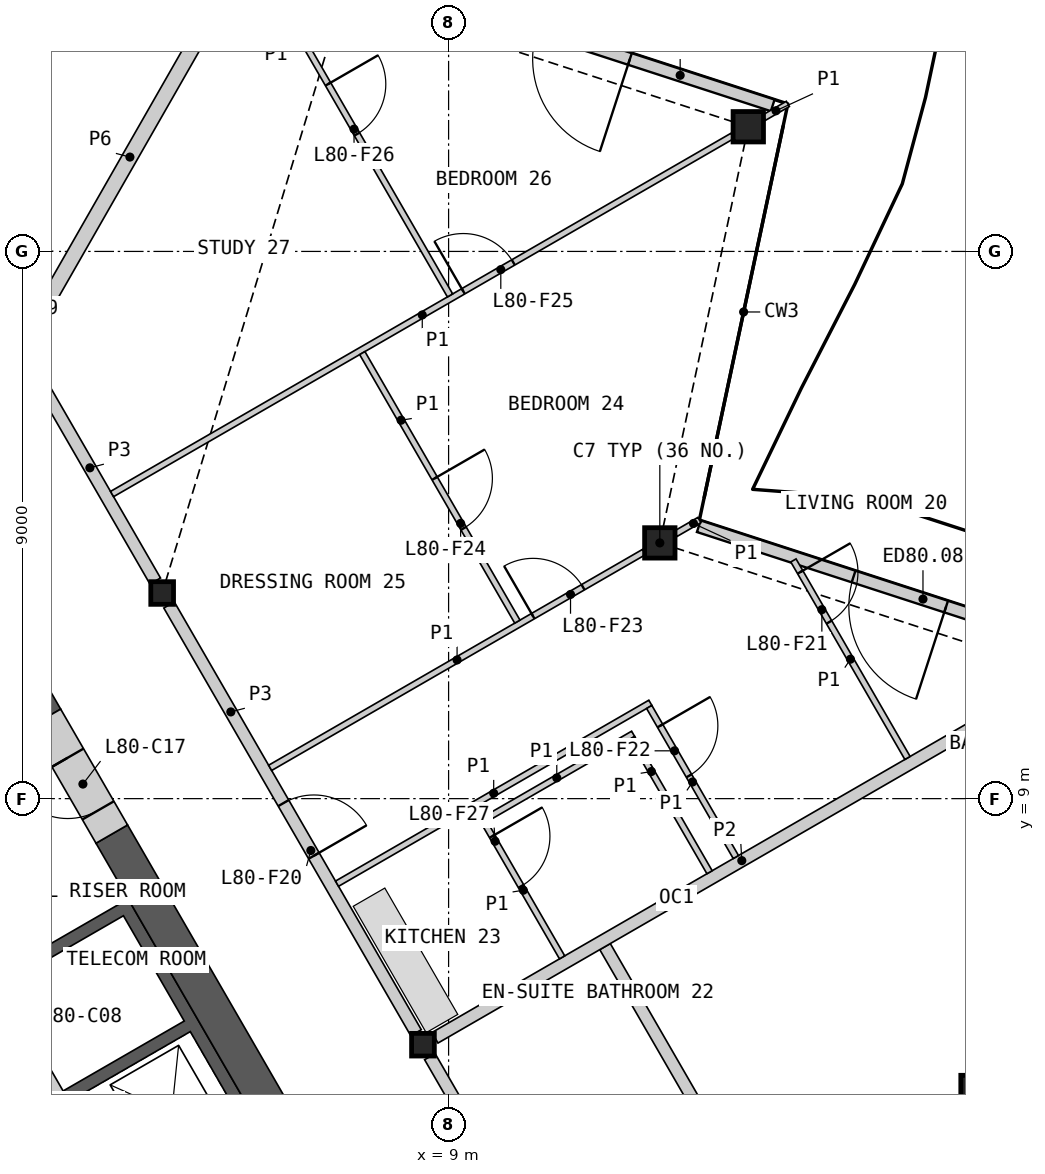
"""IFC4 building model, lengths in metres.
Left out: names, types, materials, properties, quantities, classifications, styles, units other than length and angle.
Written with IfcOpenShell. Run it as: python <this file> out.ifc"""

import sys

from ifc_helpers import new_model, si_unit, direction, frame, frame_2d, origin, origin_2d, place, context, subcontext, project, spatial, polyline, rectangle, hollow_rectangle, i_section, outline, extrude, element, fill, save


model = new_model("IFC4")
c1 = context("Model", 3, precision=1e-05, world=origin(), true_north=direction((0.0, 1.0)))
c2 = subcontext(c1, "Body", "Model", "MODEL_VIEW")
j1 = project(units=[si_unit("LENGTHUNIT", "METRE"), si_unit("PLANEANGLEUNIT", "RADIAN")], contexts=[c1])
p1 = place(None, origin())
s1 = spatial("IfcSite", under=j1, at=p1, CompositionType="ELEMENT")
p2 = place(p1, origin())
s2 = spatial("IfcBuilding", under=s1, at=p2, CompositionType="ELEMENT")
p3 = place(p2, frame((0.0, 0.0, 361.0)))
s3 = spatial("IfcBuildingStorey", under=s2, at=p3, CompositionType="ELEMENT", Elevation=361.0)
for number, where, z_axis, x_axis in (
    (1, (17.674, 4.199, 0.0), (0.0, 0.0, 1.0), (1.0, 0.0, 0.0)),
    (2, (12.474, 13.206, 0.0), (0.0, 0.0, 1.0), (1.0, 0.0, 0.0)),
    (3, (13.929, 20.051, 0.0), (0.0, 0.0, 1.0), (1.0, 0.0, 0.0)),
):
    element("IfcColumn", number, at=place(p3, frame(where, z_axis=z_axis, x_axis=x_axis)), inside=s3, PredefinedType="COLUMN", context=c2, shape_type="SweptSolid", body=[
        extrude(hollow_rectangle(XDim=0.5, YDim=0.5, WallThickness=0.03, at=origin_2d()), origin(), (0.0, 0.0, 1.0), 3.4),
    ])
for number, where, z_axis, x_axis in (
    (4, (8.578, 4.953, 0.0), (0.0, 0.0, 1.0), (1.0, 0.0, 0.0)),
    (5, (4.289, 12.382, 0.0), (0.0, 0.0, 1.0), (1.0, 0.0, 0.0)),
):
    element("IfcColumn", number, at=place(p3, frame(where, z_axis=z_axis, x_axis=x_axis)), inside=s3, PredefinedType="COLUMN", context=c2, shape_type="SweptSolid", body=[
        extrude(i_section(OverallWidth=0.374, OverallDepth=0.372, WebThickness=0.016, FlangeThickness=0.026, at=origin_2d()), origin(), (0.0, 0.0, 1.0), 3.4),
    ])
p4 = place(p3, frame((19.467, 11.416, 0.0), z_axis=(0.0, 0.0, 1.0), x_axis=(-0.951057706878, 0.309013330114, 0.0)))
e6 = element("IfcWall", 6, at=p4, inside=s3, PredefinedType="SOLIDWALL", context=c2, shape_type="SweptSolid", body=[
    extrude(rectangle(XDim=6.678, YDim=0.2, at=frame_2d((3.339, 0.0))), origin(), (0.0, 0.0, 1.0), 2.634),
])
p5 = place(p4, frame((2.402, 0.0, 0.0)))
e7 = element("IfcOpeningElement", 7, at=p5, cuts=e6, PredefinedType="OPENING", context=c2, shape_type="SweptSolid", body=[
    extrude(rectangle(XDim=1.6, YDim=2.25, at=frame_2d((0.8, 1.125))), frame((0.0, 0.11, 0.0), z_axis=(0.0, -1.0, 0.0), x_axis=(1.0, 0.0, 0.0)), (0.0, 0.0, 1.0), 0.22),
])
p6 = place(p3, frame((14.331, 20.402, 0.0), z_axis=(0.0, 0.0, 1.0), x_axis=(-0.951058447414, 0.30901105094, 0.0)))
e8 = element("IfcWall", 8, at=p6, inside=s3, PredefinedType="SOLIDWALL", context=c2, shape_type="SweptSolid", body=[
    extrude(rectangle(XDim=6.402, YDim=0.2, at=frame_2d((3.201, 0.0))), origin(), (0.0, 0.0, 1.0), 2.634),
])
p7 = place(p6, frame((2.469, 0.0, 0.0)))
e9 = element("IfcOpeningElement", 9, at=p7, cuts=e8, PredefinedType="OPENING", context=c2, shape_type="SweptSolid", body=[
    extrude(rectangle(XDim=1.6, YDim=2.25, at=frame_2d((0.8, 1.125))), frame((0.0, 0.11, 0.0), z_axis=(0.0, -1.0, 0.0), x_axis=(1.0, 0.0, 0.0)), (0.0, 0.0, 1.0), 0.22),
])
p8 = place(p3, origin())
e10 = element("IfcWall", 10, at=p8, inside=s3, PredefinedType="SHEAR", context=c2, shape_type="SweptSolid", body=[
    extrude(outline(polyline([(1.561, 6.097), (3.731, 7.35), (8.231, -0.444), (6.061, -1.697), (5.96, -1.524), (7.952, -0.374), (6.952, 1.358), (4.96, 0.208), (4.861, 0.381), (6.852, 1.531), (5.852, 3.263), (3.861, 2.113), (3.76, 2.287), (5.752, 3.437), (4.752, 5.169), (2.76, 4.019), (2.66, 4.192), (4.652, 5.342), (3.652, 7.074), (1.66, 5.924), (1.561, 6.097)])), origin(), (0.0, 0.0, 1.0), 3.1),
])
p9 = place(p3, frame((5.817, -1.476, 0.0), z_axis=(0.0, 0.0, 1.0), x_axis=(-0.500002616675, 0.866023893041, 0.0)))
e11 = element("IfcWall", 11, at=p9, inside=s3, PredefinedType="SOLIDWALL", context=c2, shape_type="SweptSolid", body=[
    extrude(rectangle(XDim=8.373, YDim=0.2, at=frame_2d((4.187, 0.0))), origin(), (0.0, 0.0, 1.0), 3.1),
])
p10 = place(p9, frame((0.337, 0.0, 0.0)))
e12 = element("IfcOpeningElement", 12, at=p10, cuts=e11, PredefinedType="OPENING", context=c2, shape_type="SweptSolid", body=[
    extrude(rectangle(XDim=1.1, YDim=2.1, at=frame_2d((0.55, 1.05))), frame((0.0, 0.11, 0.0), z_axis=(0.0, -1.0, 0.0), x_axis=(1.0, 0.0, 0.0)), (0.0, 0.0, 1.0), 0.22),
])
p11 = place(p9, frame((2.537, 0.0, 0.0)))
e13 = element("IfcOpeningElement", 13, at=p11, cuts=e11, PredefinedType="OPENING", context=c2, shape_type="SweptSolid", body=[
    extrude(rectangle(XDim=1.1, YDim=2.1, at=frame_2d((0.55, 1.05))), frame((0.0, 0.11, 0.0), z_axis=(0.0, -1.0, 0.0), x_axis=(1.0, 0.0, 0.0)), (0.0, 0.0, 1.0), 0.22),
])
p12 = place(p9, frame((4.737, 0.0, 0.0)))
e14 = element("IfcOpeningElement", 14, at=p12, cuts=e11, PredefinedType="OPENING", context=c2, shape_type="SweptSolid", body=[
    extrude(rectangle(XDim=1.1, YDim=2.1, at=frame_2d((0.55, 1.05))), frame((0.0, 0.11, 0.0), z_axis=(0.0, -1.0, 0.0), x_axis=(1.0, 0.0, 0.0)), (0.0, 0.0, 1.0), 0.22),
])
p13 = place(p9, frame((7.037, 0.0, 0.0)))
e15 = element("IfcOpeningElement", 15, at=p13, cuts=e11, PredefinedType="OPENING", context=c2, shape_type="SweptSolid", body=[
    extrude(rectangle(XDim=0.9, YDim=2.1, at=frame_2d((0.45, 1.05))), frame((0.0, 0.11, 0.0), z_axis=(0.0, -1.0, 0.0), x_axis=(1.0, 0.0, 0.0)), (0.0, 0.0, 1.0), 0.22),
])
p14 = place(p3, frame((8.686, -0.634, 0.0), z_axis=(0.0, 0.0, 1.0), x_axis=(-0.50001836461, 0.866014800712, 0.0)))
e16 = element("IfcWall", 16, at=p14, inside=s3, PredefinedType="SHEAR", context=c2, shape_type="SweptSolid", body=[
    extrude(rectangle(XDim=10.451, YDim=0.6, at=frame_2d((5.225, 0.0))), origin(), (0.0, 0.0, 1.0), 3.1),
])
p15 = place(p3, frame((2.361, 10.322, 0.0), z_axis=(0.0, 0.0, 1.0), x_axis=(-0.500000735859, 0.866024978935, 0.0)))
e17 = element("IfcWall", 17, at=p15, inside=s3, PredefinedType="SHEAR", context=c2, shape_type="SweptSolid", body=[
    extrude(rectangle(XDim=4.202, YDim=0.6, at=frame_2d((2.101, 0.0))), origin(), (0.0, 0.0, 1.0), 3.1),
])
p16 = place(p3, frame((3.461, 8.417, 0.0), z_axis=(0.0, 0.0, 1.0), x_axis=(-0.499946605688, 0.86605622881, 0.0)))
e18 = element("IfcWall", 18, at=p16, inside=s3, PredefinedType="SHEAR", context=c2, shape_type="SweptSolid", body=[
    extrude(rectangle(XDim=2.2, YDim=0.6, at=frame_2d((1.1, 0.0))), origin(), (0.0, 0.0, 1.0), 3.1),
])
p17 = place(p16, frame((0.45, 0.0, 0.0)))
e19 = element("IfcOpeningElement", 19, at=p17, cuts=e18, PredefinedType="OPENING", context=c2, shape_type="SweptSolid", body=[
    extrude(rectangle(XDim=1.0, YDim=2.1, at=frame_2d((0.5, 1.05))), frame((0.0, 0.31, 0.0), z_axis=(0.0, -1.0, 0.0), x_axis=(1.0, 0.0, 0.0)), (0.0, 0.0, 1.0), 0.62),
])
p18 = place(p3, frame((1.901, 16.302, 0.0), z_axis=(0.0, 0.0, 1.0), x_axis=(0.496368960053, 0.86811166073, 0.0)))
e20 = element("IfcWall", 20, at=p18, inside=s3, PredefinedType="PARTITIONING", context=c2, shape_type="SweptSolid", body=[
    extrude(rectangle(XDim=14.972, YDim=0.25, at=frame_2d((7.486, 0.0))), origin(), (0.0, 0.0, 1.0), 2.33),
])
p19 = place(p3, frame((4.403, 12.185, 0.0), z_axis=(0.0, 0.0, 1.0), x_axis=(0.499992155518, -0.866029932751, 0.0)))
e21 = element("IfcWall", 21, at=p19, inside=s3, PredefinedType="PARTITIONING", context=c2, shape_type="SweptSolid", body=[
    extrude(rectangle(XDim=8.123, YDim=0.2, at=frame_2d((4.062, 0.0))), origin(), (0.0, 0.0, 1.0), 3.1),
])
p20 = place(p19, frame((3.762, 0.0, 0.0)))
e22 = element("IfcOpeningElement", 22, at=p20, cuts=e21, PredefinedType="OPENING", context=c2, shape_type="SweptSolid", body=[
    extrude(rectangle(XDim=1.0, YDim=2.1, at=frame_2d((0.5, 1.05))), frame((0.0, 0.11, 0.0), z_axis=(0.0, -1.0, 0.0), x_axis=(1.0, 0.0, 0.0)), (0.0, 0.0, 1.0), 0.22),
])
p21 = place(p3, frame((8.692, 4.756, 0.0), z_axis=(0.0, 0.0, 1.0), x_axis=(0.500001682468, -0.866024432409, 0.0)))
e23 = element("IfcWall", 23, at=p21, inside=s3, PredefinedType="PARTITIONING", context=c2, shape_type="SweptSolid", body=[
    extrude(rectangle(XDim=8.124, YDim=0.2, at=frame_2d((4.062, 0.0))), origin(), (0.0, 0.0, 1.0), 3.1),
])
p22 = place(p21, frame((3.587, 0.0, 0.0)))
e24 = element("IfcOpeningElement", 24, at=p22, cuts=e23, PredefinedType="OPENING", context=c2, shape_type="SweptSolid", body=[
    extrude(rectangle(XDim=0.95, YDim=2.1, at=frame_2d((0.475, 1.05))), frame((0.0, 0.11, 0.0), z_axis=(0.0, -1.0, 0.0), x_axis=(1.0, 0.0, 0.0)), (0.0, 0.0, 1.0), 0.22),
])
p23 = place(p3, frame((2.025, 16.303, 0.0), z_axis=(0.0, 0.0, 1.0), x_axis=(0.500004215162, -0.866022970146, 0.0)))
e25 = element("IfcWall", 25, at=p23, inside=s3, PredefinedType="PARTITIONING", context=c2, shape_type="SweptSolid", body=[
    extrude(rectangle(XDim=4.3, YDim=0.2, at=frame_2d((2.15, 0.0))), origin(), (0.0, 0.0, 1.0), 3.1),
])
p24 = place(p3, frame((11.573, 6.566, 0.0), z_axis=(0.0, 0.0, 1.0), x_axis=(0.499993542657, -0.866029131901, 0.0)))
e26 = element("IfcWall", 26, at=p24, inside=s3, PredefinedType="PARTITIONING", context=c2, shape_type="SweptSolid", body=[
    extrude(rectangle(XDim=14.994, YDim=0.2, at=frame_2d((7.497, 0.0))), origin(), (0.0, 0.0, 1.0), 2.33),
])
p25 = place(p24, frame((5.166, 0.0, 0.0)))
e27 = element("IfcOpeningElement", 27, at=p25, cuts=e26, PredefinedType="OPENING", context=c2, shape_type="SweptSolid", body=[
    extrude(rectangle(XDim=0.95, YDim=2.1, at=frame_2d((0.475, 1.05))), frame((0.0, 0.11, 0.0), z_axis=(0.0, -1.0, 0.0), x_axis=(1.0, 0.0, 0.0)), (0.0, 0.0, 1.0), 0.22),
])
p26 = place(p3, frame((8.775, 5.066, 0.0), z_axis=(0.0, 0.0, 1.0), x_axis=(0.866023724155, 0.500002909193, 0.0)))
e28 = element("IfcWall", 28, at=p26, inside=s3, PredefinedType="PARTITIONING", context=c2, shape_type="SweptSolid", body=[
    extrude(rectangle(XDim=11.655, YDim=0.2, at=frame_2d((5.827, 0.0))), origin(), (0.0, 0.0, 1.0), 2.33),
])
p27 = place(p3, frame((0.755, 19.16, 0.0), z_axis=(0.0, 0.0, 1.0), x_axis=(0.15643456532, 0.987688324712, 0.0)))
e29 = element("IfcWall", 29, at=p27, inside=s3, PredefinedType="PARTITIONING", context=c2, shape_type="SweptSolid", body=[
    extrude(rectangle(XDim=12.59, YDim=0.1, at=frame_2d((6.295, 0.0))), origin(), (0.0, 0.0, 1.0), 2.33),
])
p28 = place(p27, frame((7.074, 0.0, 0.0)))
e30 = element("IfcOpeningElement", 30, at=p28, cuts=e29, PredefinedType="OPENING", context=c2, shape_type="SweptSolid", body=[
    extrude(rectangle(XDim=0.95, YDim=2.1, at=frame_2d((0.475, 1.05))), frame((0.0, 0.06, 0.0), z_axis=(0.0, -1.0, 0.0), x_axis=(1.0, 0.0, 0.0)), (0.0, 0.0, 1.0), 0.12),
])
p29 = place(p3, frame((3.465, 14.01, 0.0), z_axis=(0.0, 0.0, 1.0), x_axis=(0.866032376801, 0.499987922186, 0.0)))
e31 = element("IfcWall", 31, at=p29, inside=s3, PredefinedType="PARTITIONING", context=c2, shape_type="SweptSolid", body=[
    extrude(rectangle(XDim=11.782, YDim=0.1, at=frame_2d((5.891, 0.0))), origin(), (0.0, 0.0, 1.0), 2.33),
])
p30 = place(p29, frame((6.67, 0.0, 0.0)))
e32 = element("IfcOpeningElement", 32, at=p30, cuts=e31, PredefinedType="OPENING", context=c2, shape_type="SweptSolid", body=[
    extrude(rectangle(XDim=0.95, YDim=2.1, at=frame_2d((0.475, 1.05))), frame((0.0, 0.06, 0.0), z_axis=(0.0, -1.0, 0.0), x_axis=(1.0, 0.0, 0.0)), (0.0, 0.0, 1.0), 0.12),
])
p31 = place(p3, frame((6.065, 9.506, 0.0), z_axis=(0.0, 0.0, 1.0), x_axis=(0.866018949465, 0.500011179042, 0.0)))
e33 = element("IfcWall", 33, at=p31, inside=s3, PredefinedType="PARTITIONING", context=c2, shape_type="SweptSolid", body=[
    extrude(rectangle(XDim=7.1, YDim=0.1, at=frame_2d((3.55, 0.0))), origin(), (0.0, 0.0, 1.0), 2.33),
])
p32 = place(p31, frame((4.992, 0.0, 0.0)))
e34 = element("IfcOpeningElement", 34, at=p32, cuts=e33, PredefinedType="OPENING", context=c2, shape_type="SweptSolid", body=[
    extrude(rectangle(XDim=0.95, YDim=2.1, at=frame_2d((0.475, 1.05))), frame((0.0, 0.06, 0.0), z_axis=(0.0, -1.0, 0.0), x_axis=(1.0, 0.0, 0.0)), (0.0, 0.0, 1.0), 0.12),
])
p33 = place(p3, frame((5.787, 22.882, 0.0), z_axis=(0.0, 0.0, 1.0), x_axis=(0.500001069878, -0.866024786089, 0.0)))
e35 = element("IfcWall", 35, at=p33, inside=s3, PredefinedType="PARTITIONING", context=c2, shape_type="SweptSolid", body=[
    extrude(rectangle(XDim=6.473, YDim=0.1, at=frame_2d((3.236, 0.0))), origin(), (0.0, 0.0, 1.0), 2.33),
])
p34 = place(p33, frame((2.46, 0.0, 0.0)))
e36 = element("IfcOpeningElement", 36, at=p34, cuts=e35, PredefinedType="OPENING", context=c2, shape_type="SweptSolid", body=[
    extrude(rectangle(XDim=0.95, YDim=2.1, at=frame_2d((0.475, 1.05))), frame((0.0, 0.06, 0.0), z_axis=(0.0, -1.0, 0.0), x_axis=(1.0, 0.0, 0.0)), (0.0, 0.0, 1.0), 0.12),
])
p35 = place(p3, frame((7.165, 7.601, 0.0), z_axis=(0.0, 0.0, 1.0), x_axis=(0.866017493347, 0.500013701029, 0.0)))
e37 = element("IfcWall", 37, at=p35, inside=s3, PredefinedType="PARTITIONING", context=c2, shape_type="SweptSolid", body=[
    extrude(rectangle(XDim=5.95, YDim=0.1, at=frame_2d((2.975, 0.0))), origin(), (0.0, 0.0, 1.0), 2.33),
])
p36 = place(p3, frame((7.581, 16.328, 0.0), z_axis=(0.0, 0.0, 1.0), x_axis=(0.500005610874, -0.86602216432, 0.0)))
e38 = element("IfcWall", 38, at=p36, inside=s3, PredefinedType="PARTITIONING", context=c2, shape_type="SweptSolid", body=[
    extrude(rectangle(XDim=5.1, YDim=0.1, at=frame_2d((2.55, 0.0))), origin(), (0.0, 0.0, 1.0), 2.33),
])
p37 = place(p36, frame((2.379, 0.0, 0.0)))
e39 = element("IfcOpeningElement", 39, at=p37, cuts=e38, PredefinedType="OPENING", context=c2, shape_type="SweptSolid", body=[
    extrude(rectangle(XDim=0.95, YDim=2.1, at=frame_2d((0.475, 1.05))), frame((0.0, 0.06, 0.0), z_axis=(0.0, -1.0, 0.0), x_axis=(1.0, 0.0, 0.0)), (0.0, 0.0, 1.0), 0.12),
])
p38 = place(p3, frame((14.671, 12.918, 0.0), z_axis=(0.0, 0.0, 1.0), x_axis=(0.499981580887, -0.866036037803, 0.0)))
e40 = element("IfcWall", 40, at=p38, inside=s3, PredefinedType="PARTITIONING", context=c2, shape_type="SweptSolid", body=[
    extrude(rectangle(XDim=3.752, YDim=0.1, at=frame_2d((1.876, 0.0))), origin(), (0.0, 0.0, 1.0), 2.33),
])
p39 = place(p38, frame((0.222, 0.0, 0.0)))
e41 = element("IfcOpeningElement", 41, at=p39, cuts=e40, PredefinedType="OPENING", context=c2, shape_type="SweptSolid", body=[
    extrude(rectangle(XDim=0.95, YDim=2.1, at=frame_2d((0.475, 1.05))), frame((0.0, 0.06, 0.0), z_axis=(0.0, -1.0, 0.0), x_axis=(1.0, 0.0, 0.0)), (0.0, 0.0, 1.0), 0.12),
])
p40 = place(p3, frame((12.3, 10.508, 0.0), z_axis=(0.0, 0.0, 1.0), x_axis=(0.499999279071, -0.866025820012, 0.0)))
e42 = element("IfcWall", 42, at=p40, inside=s3, PredefinedType="PARTITIONING", context=c2, shape_type="SweptSolid", body=[
    extrude(rectangle(XDim=2.85, YDim=0.1, at=frame_2d((1.425, 0.0))), origin(), (0.0, 0.0, 1.0), 2.33),
])
p41 = place(p40, frame((0.358, 0.0, 0.0)))
e43 = element("IfcOpeningElement", 43, at=p41, cuts=e42, PredefinedType="OPENING", context=c2, shape_type="SweptSolid", body=[
    extrude(rectangle(XDim=0.95, YDim=2.1, at=frame_2d((0.475, 1.05))), frame((0.0, 0.06, 0.0), z_axis=(0.0, -1.0, 0.0), x_axis=(1.0, 0.0, 0.0)), (0.0, 0.0, 1.0), 0.12),
])
p42 = place(p3, frame((9.523, 8.616, 0.0), z_axis=(0.0, 0.0, 1.0), x_axis=(0.866032775405, 0.499987231761, 0.0)))
e44 = element("IfcWall", 44, at=p42, inside=s3, PredefinedType="PARTITIONING", context=c2, shape_type="SweptSolid", body=[
    extrude(rectangle(XDim=2.9, YDim=0.1, at=frame_2d((1.45, 0.0))), origin(), (0.0, 0.0, 1.0), 2.33),
])
p43 = place(p3, frame((12.017, 9.998, 0.0), z_axis=(0.0, 0.0, 1.0), x_axis=(0.499948979701, -0.866054858364, 0.0)))
e45 = element("IfcWall", 45, at=p43, inside=s3, PredefinedType="PARTITIONING", context=c2, shape_type="SweptSolid", body=[
    extrude(rectangle(XDim=2.55, YDim=0.1, at=frame_2d((1.275, 0.0))), origin(), (0.0, 0.0, 1.0), 2.33),
])
p44 = place(p3, frame((9.592, 8.598, 0.0), z_axis=(0.0, 0.0, 1.0), x_axis=(0.499990435942, -0.866030925526, 0.0)))
e46 = element("IfcWall", 46, at=p44, inside=s3, PredefinedType="PARTITIONING", context=c2, shape_type="SweptSolid", body=[
    extrude(rectangle(XDim=2.55, YDim=0.1, at=frame_2d((1.275, 0.0))), origin(), (0.0, 0.0, 1.0), 2.33),
])
p45 = place(p44, frame((0.25, 0.0, 0.0)))
e47 = element("IfcOpeningElement", 47, at=p45, cuts=e46, PredefinedType="OPENING", context=c2, shape_type="SweptSolid", body=[
    extrude(rectangle(XDim=0.95, YDim=2.1, at=frame_2d((0.475, 1.05))), frame((0.0, 0.06, 0.0), z_axis=(0.0, -1.0, 0.0), x_axis=(1.0, 0.0, 0.0)), (0.0, 0.0, 1.0), 0.12),
])
for number, where, z_axis, x_axis in (
    (48, (14.189, 20.201, 0.0), (0.0, 0.0, 1.0), (0.866, 0.5, 0.0)),
    (49, (12.734, 13.356, 0.0), (0.0, 0.0, 1.0), (0.866, 0.5, 0.0)),
):
    element("IfcWall", number, at=place(p3, frame(where, z_axis=z_axis, x_axis=x_axis)), inside=s3, PredefinedType="PARTITIONING", context=c2, shape_type="SweptSolid", body=[
        extrude(rectangle(XDim=0.451, YDim=0.1, at=frame_2d((0.226, 0.0))), origin(), (0.0, 0.0, 1.0), 2.33),
    ])
p46 = place(p5, origin())
e50 = element("IfcDoor", 50, at=p46, inside=s3, OperationType="DOUBLE_DOOR_SINGLE_SWING", PredefinedType="DOOR", context=c2, shape_type="SweptSolid", body=[
    extrude(rectangle(XDim=1.6, YDim=2.25, at=frame_2d((0.8, 1.125))), frame((0.0, 0.025, 0.0), z_axis=(0.0, -1.0, 0.0), x_axis=(1.0, 0.0, 0.0)), (0.0, 0.0, 1.0), 0.05),
])
fill(e7, e50)
p47 = place(p7, origin())
e51 = element("IfcDoor", 51, at=p47, inside=s3, OperationType="DOUBLE_DOOR_SINGLE_SWING", PredefinedType="DOOR", context=c2, shape_type="SweptSolid", body=[
    extrude(rectangle(XDim=1.6, YDim=2.25, at=frame_2d((0.8, 1.125))), frame((0.0, 0.025, 0.0), z_axis=(0.0, -1.0, 0.0), x_axis=(1.0, 0.0, 0.0)), (0.0, 0.0, 1.0), 0.05),
])
fill(e9, e51)
p48 = place(p17, origin())
e52 = element("IfcDoor", 52, at=p48, inside=s3, OperationType="SINGLE_SWING_RIGHT", PredefinedType="DOOR", context=c2, shape_type="SweptSolid", body=[
    extrude(rectangle(XDim=1.0, YDim=2.1, at=frame_2d((0.5, 1.05))), frame((0.0, 0.055, 0.0), z_axis=(0.0, -1.0, 0.0), x_axis=(1.0, 0.0, 0.0)), (0.0, 0.0, 1.0), 0.05),
])
fill(e19, e52)
p49 = place(p20, origin())
e53 = element("IfcDoor", 53, at=p49, inside=s3, OperationType="SINGLE_SWING_RIGHT", PredefinedType="DOOR", context=c2, shape_type="SweptSolid", body=[
    extrude(rectangle(XDim=1.0, YDim=2.1, at=frame_2d((0.5, 1.05))), frame((0.0, 0.025, 0.0), z_axis=(0.0, -1.0, 0.0), x_axis=(1.0, 0.0, 0.0)), (0.0, 0.0, 1.0), 0.05),
])
fill(e22, e53)
p50 = place(p39, origin())
e54 = element("IfcDoor", 54, at=p50, inside=s3, OperationType="SINGLE_SWING_LEFT", PredefinedType="DOOR", context=c2, shape_type="SweptSolid", body=[
    extrude(rectangle(XDim=0.95, YDim=2.1, at=frame_2d((0.475, 1.05))), frame((0.0, 0.025, 0.0), z_axis=(0.0, -1.0, 0.0), x_axis=(1.0, 0.0, 0.0)), (0.0, 0.0, 1.0), 0.05),
])
fill(e41, e54)
p51 = place(p41, origin())
e55 = element("IfcDoor", 55, at=p51, inside=s3, OperationType="SINGLE_SWING_LEFT", PredefinedType="DOOR", context=c2, shape_type="SweptSolid", body=[
    extrude(rectangle(XDim=0.95, YDim=2.1, at=frame_2d((0.475, 1.05))), frame((0.0, 0.025, 0.0), z_axis=(0.0, -1.0, 0.0), x_axis=(1.0, 0.0, 0.0)), (0.0, 0.0, 1.0), 0.05),
])
fill(e43, e55)
p52 = place(p32, origin())
e56 = element("IfcDoor", 56, at=p52, inside=s3, OperationType="SINGLE_SWING_LEFT", PredefinedType="DOOR", context=c2, shape_type="SweptSolid", body=[
    extrude(rectangle(XDim=0.95, YDim=2.1, at=frame_2d((0.475, 1.05))), frame((0.0, 0.025, 0.0), z_axis=(0.0, -1.0, 0.0), x_axis=(1.0, 0.0, 0.0)), (0.0, 0.0, 1.0), 0.05),
])
fill(e34, e56)
p53 = place(p37, origin())
e57 = element("IfcDoor", 57, at=p53, inside=s3, OperationType="SINGLE_SWING_LEFT", PredefinedType="DOOR", context=c2, shape_type="SweptSolid", body=[
    extrude(rectangle(XDim=0.95, YDim=2.1, at=frame_2d((0.475, 1.05))), frame((0.0, 0.025, 0.0), z_axis=(0.0, -1.0, 0.0), x_axis=(1.0, 0.0, 0.0)), (0.0, 0.0, 1.0), 0.05),
])
fill(e39, e57)
p54 = place(p30, origin())
e58 = element("IfcDoor", 58, at=p54, inside=s3, OperationType="SINGLE_SWING_LEFT", PredefinedType="DOOR", context=c2, shape_type="SweptSolid", body=[
    extrude(rectangle(XDim=0.95, YDim=2.1, at=frame_2d((0.475, 1.05))), frame((0.0, 0.025, 0.0), z_axis=(0.0, -1.0, 0.0), x_axis=(1.0, 0.0, 0.0)), (0.0, 0.0, 1.0), 0.05),
])
fill(e32, e58)
p55 = place(p34, origin())
e59 = element("IfcDoor", 59, at=p55, inside=s3, OperationType="SINGLE_SWING_LEFT", PredefinedType="DOOR", context=c2, shape_type="SweptSolid", body=[
    extrude(rectangle(XDim=0.95, YDim=2.1, at=frame_2d((0.475, 1.05))), frame((0.0, 0.025, 0.0), z_axis=(0.0, -1.0, 0.0), x_axis=(1.0, 0.0, 0.0)), (0.0, 0.0, 1.0), 0.05),
])
fill(e36, e59)
p56 = place(p45, origin())
e60 = element("IfcDoor", 60, at=p56, inside=s3, OperationType="SINGLE_SWING_LEFT", PredefinedType="DOOR", context=c2, shape_type="SweptSolid", body=[
    extrude(rectangle(XDim=0.95, YDim=2.1, at=frame_2d((0.475, 1.05))), frame((0.0, 0.025, 0.0), z_axis=(0.0, -1.0, 0.0), x_axis=(1.0, 0.0, 0.0)), (0.0, 0.0, 1.0), 0.05),
])
fill(e47, e60)
save(model, sys.argv[1])
